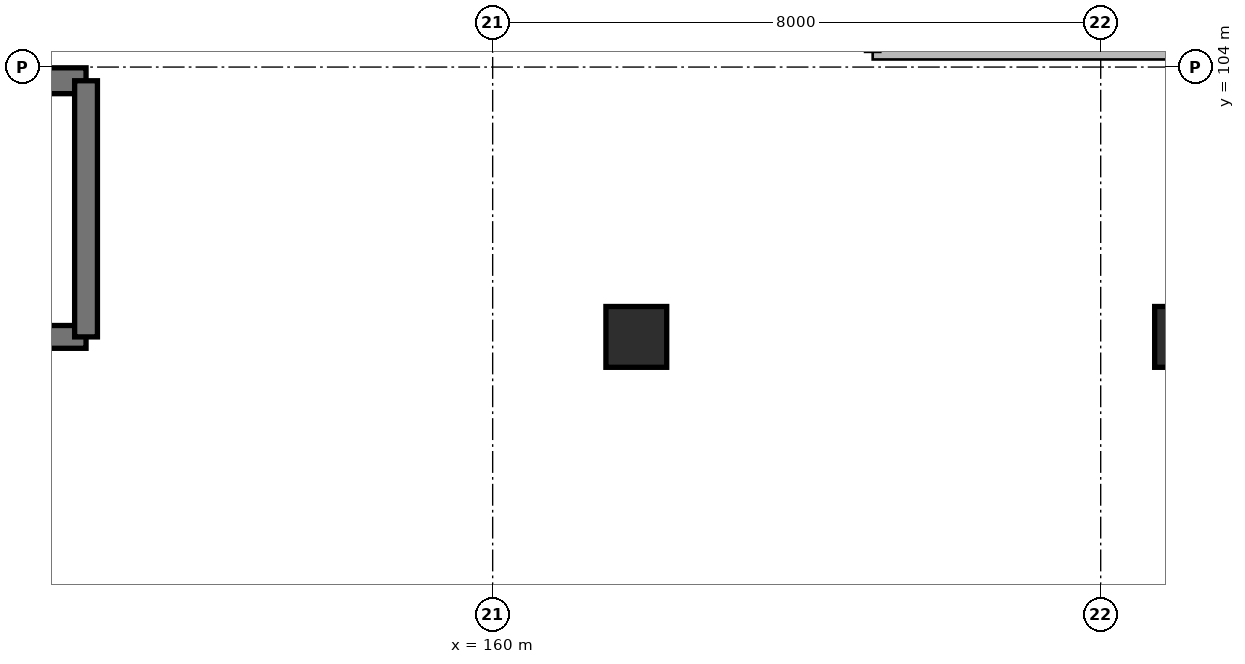
"""IFC4 building model, lengths in metres.
Left out: names, types, materials, properties, quantities, classifications, styles, units other than length and angle.
Written with IfcOpenShell. Run it as: python <this file> out.ifc"""

import sys

from ifc_helpers import new_model, si_unit, direction, frame, frame_2d, origin, origin_2d, place, context, subcontext, project, spatial, rectangle, extrude, element, save


model = new_model("IFC4")
c1 = context("Model", 3, precision=1e-05, world=origin(), true_north=direction((0.0, 1.0)))
c2 = subcontext(c1, "Body", "Model", "MODEL_VIEW")
j1 = project(units=[si_unit("LENGTHUNIT", "METRE"), si_unit("PLANEANGLEUNIT", "RADIAN")], contexts=[c1])
p1 = place(None, origin())
s1 = spatial("IfcSite", under=j1, at=p1, CompositionType="ELEMENT")
p2 = place(p1, origin())
s2 = spatial("IfcBuilding", under=s1, at=p2, CompositionType="ELEMENT")
p3 = place(p2, frame((0.0, 0.0, -3.84)))
s3 = spatial("IfcBuildingStorey", under=s2, at=p3, CompositionType="ELEMENT", Elevation=-3.84)
for number, where, z_axis, x_axis in (
    (1, (161.89, 100.45, 0.0), (0.0, 0.0, 1.0), (1.0, 0.0, 0.0)),
    (2, (169.11, 100.45, 0.0), (0.0, 0.0, 1.0), (1.0, 0.0, 0.0)),
):
    element("IfcColumn", number, at=place(p3, frame(where, z_axis=z_axis, x_axis=x_axis)), inside=s3, PredefinedType="COLUMN", context=c2, shape_type="SweptSolid", body=[
        extrude(rectangle(XDim=0.8, YDim=0.8, at=origin_2d()), origin(), (0.0, 0.0, 1.0), 3.84),
    ])
p4 = place(p3, frame((147.75, 100.45, 0.0), z_axis=(0.0, 0.0, 1.0), x_axis=(1.0, 0.0, 0.0)))
e3 = element("IfcWall", 3, at=p4, inside=s3, PredefinedType="SHEAR", context=c2, shape_type="SweptSolid", body=[
    extrude(rectangle(XDim=6.9, YDim=0.3, at=frame_2d((3.45, 0.0))), origin(), (0.0, 0.0, 1.0), 3.84),
])
p5 = place(p3, frame((154.65, 103.82, 0.0), z_axis=(0.0, 0.0, 1.0), x_axis=(-1.0, 0.0, 0.0)))
e4 = element("IfcWall", 4, at=p5, inside=s3, PredefinedType="SHEAR", context=c2, shape_type="SweptSolid", body=[
    extrude(rectangle(XDim=6.9, YDim=0.34, at=frame_2d((3.45, 0.0))), origin(), (0.0, 0.0, 1.0), 3.84),
])
p6 = place(p3, frame((154.65, 100.45, 0.0), z_axis=(0.0, 0.0, 1.0), x_axis=(0.0, 1.0, 0.0)))
e5 = element("IfcWall", 5, at=p6, inside=s3, PredefinedType="SHEAR", context=c2, shape_type="SweptSolid", body=[
    extrude(rectangle(XDim=3.37, YDim=0.3, at=frame_2d((1.685, 0.0))), origin(), (0.0, 0.0, 1.0), 3.84),
])
p7 = place(p3, frame((165.0, 104.2, 0.0), z_axis=(0.0, 0.0, 1.0), x_axis=(1.0, 0.0, 0.0)))
e6 = element("IfcWall", 6, at=p7, inside=s3, PredefinedType="SOLIDWALL", context=c2, shape_type="SweptSolid", body=[
    extrude(rectangle(XDim=18.2, YDim=0.2, at=frame_2d((9.1, 0.0))), origin(), (0.0, 0.0, 1.0), 3.52),
])
p8 = place(p7, frame((8.6, 0.0, 0.0)))
e7 = element("IfcOpeningElement", 7, at=p8, cuts=e6, PredefinedType="OPENING", context=c2, shape_type="SweptSolid", body=[
    extrude(rectangle(XDim=1.0, YDim=2.1, at=frame_2d((0.5, 1.05))), frame((0.0, 0.11, 0.0), z_axis=(0.0, -1.0, 0.0), x_axis=(1.0, 0.0, 0.0)), (0.0, 0.0, 1.0), 0.22),
])
save(model, sys.argv[1])
